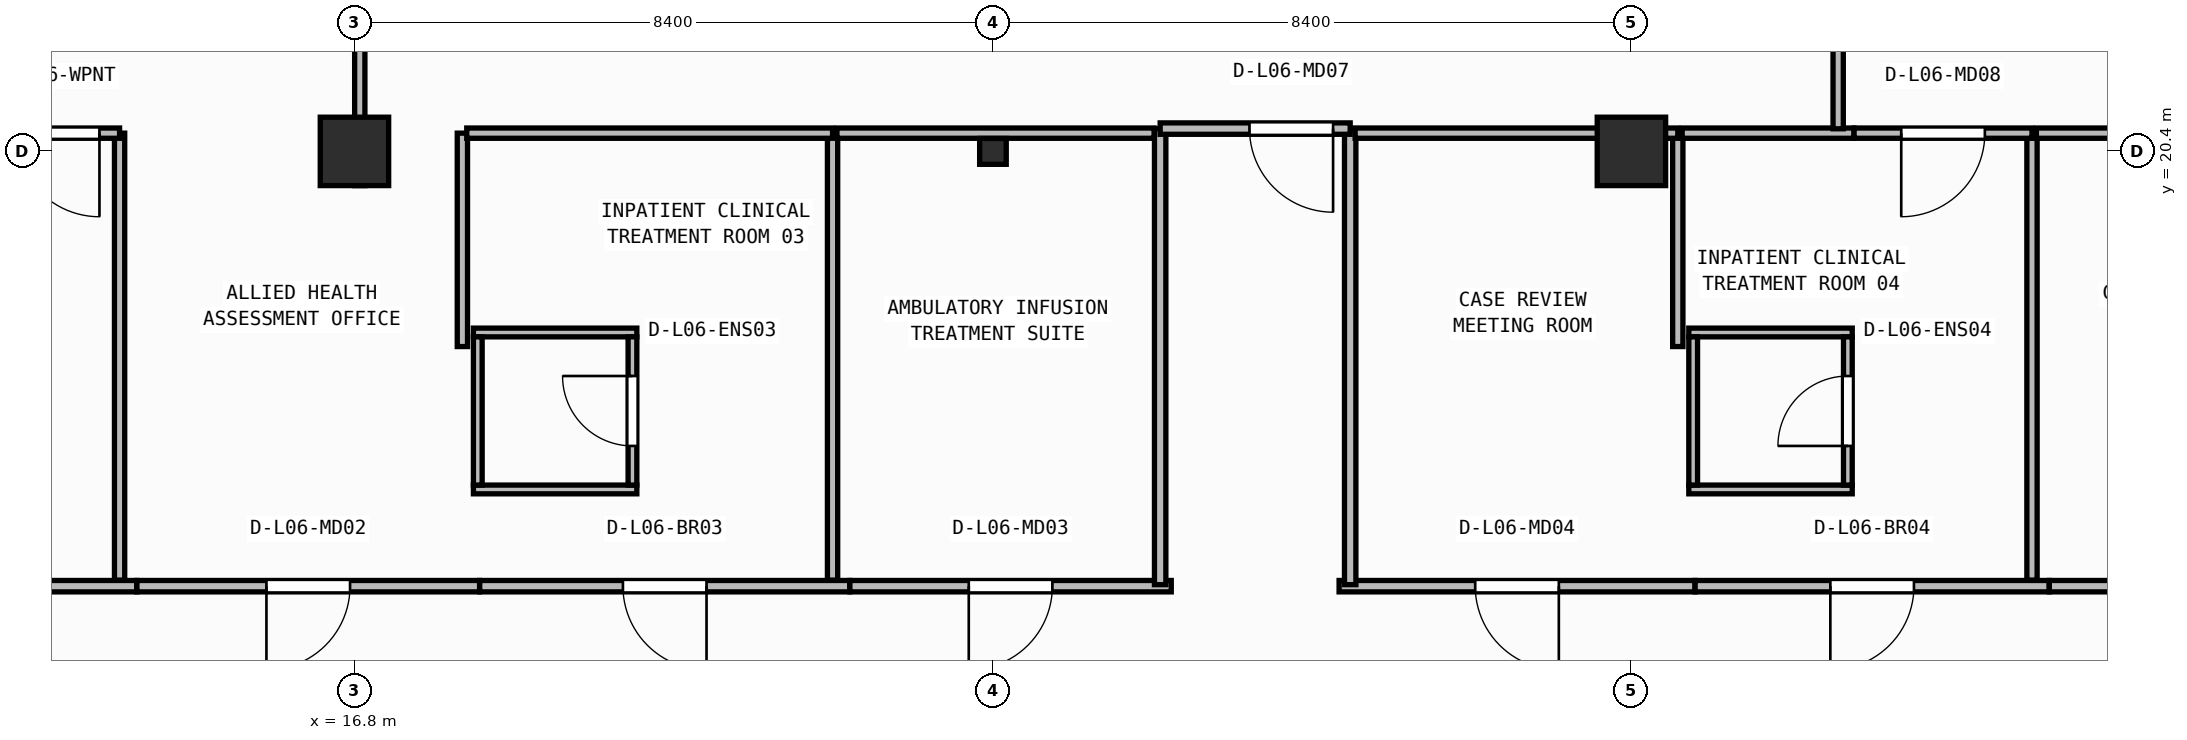
"""IFC4 building model, lengths in metres.
Left out: names, types, materials, properties, quantities, classifications, styles, units other than length and angle.
Written with IfcOpenShell. Run it as: python <this file> out.ifc"""

import sys

from ifc_helpers import new_model, si_unit, direction, frame, frame_2d, origin, origin_2d, place, context, subcontext, project, spatial, rectangle, i_section, extrude, element, fill, save


model = new_model("IFC4")
c1 = context("Model", 3, precision=1e-05, world=origin(), true_north=direction((0.0, 1.0)))
c2 = subcontext(c1, "Body", "Model", "MODEL_VIEW")
j1 = project(units=[si_unit("LENGTHUNIT", "METRE"), si_unit("PLANEANGLEUNIT", "RADIAN")], contexts=[c1])
p1 = place(None, origin())
s1 = spatial("IfcSite", under=j1, at=p1, CompositionType="ELEMENT")
p2 = place(p1, origin())
s2 = spatial("IfcBuilding", under=s1, at=p2, CompositionType="ELEMENT")
p3 = place(p2, frame((0.0, 0.0, 26.45)))
s3 = spatial("IfcBuildingStorey", under=s2, at=p3, CompositionType="ELEMENT", Elevation=26.45)
p4 = place(p3, frame((16.8, 20.4, 0.0), z_axis=(0.0, 0.0, 1.0), x_axis=(1.0, 0.0, 0.0)))
e1 = element("IfcColumn", 1, at=p4, inside=s3, PredefinedType="COLUMN", context=c2, shape_type="SweptSolid", body=[
    extrude(rectangle(XDim=0.9, YDim=0.9, at=origin_2d()), origin(), (0.0, 0.0, 1.0), 3.95),
])
p5 = place(p3, frame((25.2, 20.4, 0.0), z_axis=(0.0, 0.0, 1.0), x_axis=(1.0, 0.0, 0.0)))
e2 = element("IfcColumn", 2, at=p5, inside=s3, PredefinedType="COLUMN", context=c2, shape_type="SweptSolid", body=[
    extrude(i_section(OverallWidth=0.35, OverallDepth=0.34, WebThickness=0.016, FlangeThickness=0.028, at=origin_2d()), origin(), (0.0, 0.0, 1.0), 3.95),
])
p6 = place(p3, frame((33.6, 20.4, 0.0), z_axis=(0.0, 0.0, 1.0), x_axis=(1.0, 0.0, 0.0)))
e3 = element("IfcColumn", 3, at=p6, inside=s3, PredefinedType="COLUMN", context=c2, shape_type="SweptSolid", body=[
    extrude(rectangle(XDim=0.9, YDim=0.9, at=origin_2d()), origin(), (0.0, 0.0, 1.0), 3.95),
])
for number, where, z_axis, x_axis in (
    (4, (18.365, 15.952, 0.0), (0.0, 0.0, 1.0), (1.0, 0.0, 0.0)),
    (5, (18.365, 18.018, 0.0), (0.0, 0.0, 1.0), (1.0, 0.0, 0.0)),
):
    element("IfcWall", number, at=place(p3, frame(where, z_axis=z_axis, x_axis=x_axis)), inside=s3, PredefinedType="PARTITIONING", context=c2, shape_type="SweptSolid", body=[
        extrude(rectangle(XDim=2.15, YDim=0.115, at=frame_2d((1.075, 0.0))), origin(), (0.0, 0.0, 1.0), 3.71),
    ])
p7 = place(p3, frame((18.423, 16.01, 0.0), z_axis=(0.0, 0.0, 1.0), x_axis=(0.0, 1.0, 0.0)))
e6 = element("IfcWall", 6, at=p7, inside=s3, PredefinedType="PARTITIONING", context=c2, shape_type="SweptSolid", body=[
    extrude(rectangle(XDim=1.95, YDim=0.115, at=frame_2d((0.975, 0.0))), origin(), (0.0, 0.0, 1.0), 3.71),
])
p8 = place(p3, frame((20.458, 16.01, 0.0), z_axis=(0.0, 0.0, 1.0), x_axis=(0.0, 1.0, 0.0)))
e7 = element("IfcWall", 7, at=p8, inside=s3, PredefinedType="PARTITIONING", context=c2, shape_type="SweptSolid", body=[
    extrude(rectangle(XDim=1.95, YDim=0.115, at=frame_2d((0.975, 0.0))), origin(), (0.0, 0.0, 1.0), 3.71),
])
p9 = place(p8, frame((0.515, 0.0, 0.0)))
e8 = element("IfcOpeningElement", 8, at=p9, cuts=e7, PredefinedType="OPENING", context=c2, shape_type="SweptSolid", body=[
    extrude(rectangle(XDim=0.92, YDim=2.1, at=frame_2d((0.46, 1.05))), frame((0.0, 0.067, 0.0), z_axis=(0.0, -1.0, 0.0), x_axis=(1.0, 0.0, 0.0)), (0.0, 0.0, 1.0), 0.135),
])
p10 = place(p3, frame((34.355, 15.952, 0.0), z_axis=(0.0, 0.0, 1.0), x_axis=(1.0, 0.0, 0.0)))
e9 = element("IfcWall", 9, at=p10, inside=s3, PredefinedType="PARTITIONING", context=c2, shape_type="SweptSolid", body=[
    extrude(rectangle(XDim=2.15, YDim=0.115, at=frame_2d((1.075, 0.0))), origin(), (0.0, 0.0, 1.0), 3.378),
])
p11 = place(p3, frame((34.355, 18.018, 0.0), z_axis=(0.0, 0.0, 1.0), x_axis=(1.0, 0.0, 0.0)))
e10 = element("IfcWall", 10, at=p11, inside=s3, PredefinedType="PARTITIONING", context=c2, shape_type="SweptSolid", body=[
    extrude(rectangle(XDim=2.15, YDim=0.115, at=frame_2d((1.075, 0.0))), origin(), (0.0, 0.0, 1.0), 3.71),
])
p12 = place(p3, frame((34.413, 16.01, 0.0), z_axis=(0.0, 0.0, 1.0), x_axis=(0.0, 1.0, 0.0)))
e11 = element("IfcWall", 11, at=p12, inside=s3, PredefinedType="PARTITIONING", context=c2, shape_type="SweptSolid", body=[
    extrude(rectangle(XDim=1.95, YDim=0.115, at=frame_2d((0.975, 0.0))), origin(), (0.0, 0.0, 1.0), 3.71),
])
p13 = place(p3, frame((36.448, 16.01, 0.0), z_axis=(0.0, 0.0, 1.0), x_axis=(0.0, 1.0, 0.0)))
e12 = element("IfcWall", 12, at=p13, inside=s3, PredefinedType="PARTITIONING", context=c2, shape_type="SweptSolid", body=[
    extrude(rectangle(XDim=1.95, YDim=0.115, at=frame_2d((0.975, 0.0))), origin(), (0.0, 0.0, 1.0), 3.71),
])
p14 = place(p13, frame((0.515, 0.0, 0.0)))
e13 = element("IfcOpeningElement", 13, at=p14, cuts=e12, PredefinedType="OPENING", context=c2, shape_type="SweptSolid", body=[
    extrude(rectangle(XDim=0.92, YDim=2.1, at=frame_2d((0.46, 1.05))), frame((0.0, 0.067, 0.0), z_axis=(0.0, -1.0, 0.0), x_axis=(1.0, 0.0, 0.0)), (0.0, 0.0, 1.0), 0.135),
])
p15 = place(p3, frame((13.936, 14.68, 0.0), z_axis=(0.0, 0.0, 1.0), x_axis=(-1.0, 0.0, 0.0)))
e14 = element("IfcWall", 14, at=p15, inside=s3, PredefinedType="PARTITIONING", context=c2, shape_type="SweptSolid", body=[
    extrude(rectangle(XDim=4.148, YDim=0.15, at=frame_2d((2.074, 0.0))), origin(), (0.0, 0.0, 1.0), 3.71),
])
p16 = place(p15, frame((1.524, 0.0, 0.0)))
e15 = element("IfcOpeningElement", 15, at=p16, cuts=e14, PredefinedType="OPENING", context=c2, shape_type="SweptSolid", body=[
    extrude(rectangle(XDim=1.1, YDim=2.1, at=frame_2d((0.55, 1.05))), frame((0.0, 0.085, 0.0), z_axis=(0.0, -1.0, 0.0), x_axis=(1.0, 0.0, 0.0)), (0.0, 0.0, 1.0), 0.17),
])
p17 = place(p3, frame((18.446, 14.68, 0.0), z_axis=(0.0, 0.0, 1.0), x_axis=(-1.0, 0.0, 0.0)))
e16 = element("IfcWall", 16, at=p17, inside=s3, PredefinedType="PARTITIONING", context=c2, shape_type="SweptSolid", body=[
    extrude(rectangle(XDim=4.508, YDim=0.15, at=frame_2d((2.254, 0.0))), origin(), (0.0, 0.0, 1.0), 3.71),
])
p18 = place(p17, frame((1.704, 0.0, 0.0)))
e17 = element("IfcOpeningElement", 17, at=p18, cuts=e16, PredefinedType="OPENING", context=c2, shape_type="SweptSolid", body=[
    extrude(rectangle(XDim=1.1, YDim=2.1, at=frame_2d((0.55, 1.05))), frame((0.0, 0.085, 0.0), z_axis=(0.0, -1.0, 0.0), x_axis=(1.0, 0.0, 0.0)), (0.0, 0.0, 1.0), 0.17),
])
p19 = place(p3, frame((23.316, 14.68, 0.0), z_axis=(0.0, 0.0, 1.0), x_axis=(-1.0, 0.0, 0.0)))
e18 = element("IfcWall", 18, at=p19, inside=s3, PredefinedType="PARTITIONING", context=c2, shape_type="SweptSolid", body=[
    extrude(rectangle(XDim=4.868, YDim=0.15, at=frame_2d((2.434, 0.0))), origin(), (0.0, 0.0, 1.0), 3.71),
])
p20 = place(p19, frame((1.884, 0.0, 0.0)))
e19 = element("IfcOpeningElement", 19, at=p20, cuts=e18, PredefinedType="OPENING", context=c2, shape_type="SweptSolid", body=[
    extrude(rectangle(XDim=1.1, YDim=2.1, at=frame_2d((0.55, 1.05))), frame((0.0, 0.085, 0.0), z_axis=(0.0, -1.0, 0.0), x_axis=(1.0, 0.0, 0.0)), (0.0, 0.0, 1.0), 0.17),
])
p21 = place(p3, frame((27.546, 14.68, 0.0), z_axis=(0.0, 0.0, 1.0), x_axis=(-1.0, 0.0, 0.0)))
e20 = element("IfcWall", 20, at=p21, inside=s3, PredefinedType="PARTITIONING", context=c2, shape_type="SweptSolid", body=[
    extrude(rectangle(XDim=4.228, YDim=0.15, at=frame_2d((2.114, 0.0))), origin(), (0.0, 0.0, 1.0), 3.71),
])
p22 = place(p21, frame((1.564, 0.0, 0.0)))
e21 = element("IfcOpeningElement", 21, at=p22, cuts=e20, PredefinedType="OPENING", context=c2, shape_type="SweptSolid", body=[
    extrude(rectangle(XDim=1.1, YDim=2.1, at=frame_2d((0.55, 1.05))), frame((0.0, 0.085, 0.0), z_axis=(0.0, -1.0, 0.0), x_axis=(1.0, 0.0, 0.0)), (0.0, 0.0, 1.0), 0.17),
])
p23 = place(p3, frame((34.436, 14.68, 0.0), z_axis=(0.0, 0.0, 1.0), x_axis=(-1.0, 0.0, 0.0)))
e22 = element("IfcWall", 22, at=p23, inside=s3, PredefinedType="PARTITIONING", context=c2, shape_type="SweptSolid", body=[
    extrude(rectangle(XDim=4.682, YDim=0.15, at=frame_2d((2.341, 0.0))), origin(), (0.0, 0.0, 1.0), 3.71),
])
p24 = place(p23, frame((1.791, 0.0, 0.0)))
e23 = element("IfcOpeningElement", 23, at=p24, cuts=e22, PredefinedType="OPENING", context=c2, shape_type="SweptSolid", body=[
    extrude(rectangle(XDim=1.1, YDim=2.1, at=frame_2d((0.55, 1.05))), frame((0.0, 0.085, 0.0), z_axis=(0.0, -1.0, 0.0), x_axis=(1.0, 0.0, 0.0)), (0.0, 0.0, 1.0), 0.17),
])
p25 = place(p3, frame((39.096, 14.68, 0.0), z_axis=(0.0, 0.0, 1.0), x_axis=(-1.0, 0.0, 0.0)))
e24 = element("IfcWall", 24, at=p25, inside=s3, PredefinedType="PARTITIONING", context=c2, shape_type="SweptSolid", body=[
    extrude(rectangle(XDim=4.658, YDim=0.15, at=frame_2d((2.329, 0.0))), origin(), (0.0, 0.0, 1.0), 3.71),
])
p26 = place(p25, frame((1.779, 0.0, 0.0)))
e25 = element("IfcOpeningElement", 25, at=p26, cuts=e24, PredefinedType="OPENING", context=c2, shape_type="SweptSolid", body=[
    extrude(rectangle(XDim=1.1, YDim=2.1, at=frame_2d((0.55, 1.05))), frame((0.0, 0.085, 0.0), z_axis=(0.0, -1.0, 0.0), x_axis=(1.0, 0.0, 0.0)), (0.0, 0.0, 1.0), 0.17),
])
p27 = place(p3, frame((44.136, 14.68, 0.0), z_axis=(0.0, 0.0, 1.0), x_axis=(-1.0, 0.0, 0.0)))
e26 = element("IfcWall", 26, at=p27, inside=s3, PredefinedType="PARTITIONING", context=c2, shape_type="SweptSolid", body=[
    extrude(rectangle(XDim=5.038, YDim=0.15, at=frame_2d((2.519, 0.0))), origin(), (0.0, 0.0, 1.0), 3.71),
])
p28 = place(p27, frame((1.969, 0.0, 0.0)))
e27 = element("IfcOpeningElement", 27, at=p28, cuts=e26, PredefinedType="OPENING", context=c2, shape_type="SweptSolid", body=[
    extrude(rectangle(XDim=1.1, YDim=2.1, at=frame_2d((0.55, 1.05))), frame((0.0, 0.085, 0.0), z_axis=(0.0, -1.0, 0.0), x_axis=(1.0, 0.0, 0.0)), (0.0, 0.0, 1.0), 0.17),
])
for number, where, z_axis, x_axis in (
    (28, (27.4, 20.7, 0.0), (0.0, 0.0, 1.0), (0.0, -1.0, 0.0)),
    (29, (29.9, 14.7, 0.0), (0.0, 0.0, 1.0), (0.0, 1.0, 0.0)),
):
    element("IfcWall", number, at=place(p3, frame(where, z_axis=z_axis, x_axis=x_axis)), inside=s3, PredefinedType="PARTITIONING", context=c2, shape_type="SweptSolid", body=[
        extrude(rectangle(XDim=6.0, YDim=0.15, at=frame_2d((3.0, 0.0))), origin(), (0.0, 0.0, 1.0), 3.71),
    ])
p29 = place(p3, frame((29.9, 20.7, 0.0), z_axis=(0.0, 0.0, 1.0), x_axis=(-1.0, 0.0, 0.0)))
e30 = element("IfcWall", 30, at=p29, inside=s3, PredefinedType="PARTITIONING", context=c2, shape_type="SweptSolid", body=[
    extrude(rectangle(XDim=2.5, YDim=0.15, at=frame_2d((1.25, 0.0))), origin(), (0.0, 0.0, 1.0), 3.073),
])
p30 = place(p29, frame((0.225, 0.0, 0.0)))
e31 = element("IfcOpeningElement", 31, at=p30, cuts=e30, PredefinedType="OPENING", context=c2, shape_type="SweptSolid", body=[
    extrude(rectangle(XDim=1.1, YDim=2.1, at=frame_2d((0.55, 1.05))), frame((0.0, 0.085, 0.0), z_axis=(0.0, -1.0, 0.0), x_axis=(1.0, 0.0, 0.0)), (0.0, 0.0, 1.0), 0.17),
])
p31 = place(p3, frame((13.71, 14.76, 0.0), z_axis=(0.0, 0.0, 1.0), x_axis=(0.0, 1.0, 0.0)))
e32 = element("IfcWall", 32, at=p31, inside=s3, PredefinedType="PARTITIONING", context=c2, shape_type="SweptSolid", body=[
    extrude(rectangle(XDim=5.88, YDim=0.135, at=frame_2d((2.94, 0.0))), origin(), (0.0, 0.0, 1.0), 3.71),
])
p32 = place(p3, frame((13.71, 20.64, 0.0), z_axis=(0.0, 0.0, 1.0), x_axis=(-1.0, 0.0, 0.0)))
e33 = element("IfcWall", 33, at=p32, inside=s3, PredefinedType="PARTITIONING", context=c2, shape_type="SweptSolid", body=[
    extrude(rectangle(XDim=4.093, YDim=0.135, at=frame_2d((2.046, 0.0))), origin(), (0.0, 0.0, 1.0), 3.073),
])
p33 = place(p32, frame((0.265, 0.0, 0.0)))
e34 = element("IfcOpeningElement", 34, at=p33, cuts=e33, PredefinedType="OPENING", context=c2, shape_type="SweptSolid", body=[
    extrude(rectangle(XDim=1.1, YDim=2.1, at=frame_2d((0.55, 1.05))), frame((0.0, 0.077, 0.0), z_axis=(0.0, -1.0, 0.0), x_axis=(1.0, 0.0, 0.0)), (0.0, 0.0, 1.0), 0.155),
])
p34 = place(p3, frame((18.22, 17.833, 0.0), z_axis=(0.0, 0.0, 1.0), x_axis=(0.0, 1.0, 0.0)))
e35 = element("IfcWall", 35, at=p34, inside=s3, PredefinedType="PARTITIONING", context=c2, shape_type="SweptSolid", body=[
    extrude(rectangle(XDim=2.807, YDim=0.135, at=frame_2d((1.404, 0.0))), origin(), (0.0, 0.0, 1.0), 3.71),
])
p35 = place(p3, frame((23.09, 14.76, 0.0), z_axis=(0.0, 0.0, 1.0), x_axis=(0.0, 1.0, 0.0)))
e36 = element("IfcWall", 36, at=p35, inside=s3, PredefinedType="PARTITIONING", context=c2, shape_type="SweptSolid", body=[
    extrude(rectangle(XDim=5.88, YDim=0.135, at=frame_2d((2.94, 0.0))), origin(), (0.0, 0.0, 1.0), 3.71),
])
p36 = place(p3, frame((23.09, 20.64, 0.0), z_axis=(0.0, 0.0, 1.0), x_axis=(-1.0, 0.0, 0.0)))
e37 = element("IfcWall", 37, at=p36, inside=s3, PredefinedType="PARTITIONING", context=c2, shape_type="SweptSolid", body=[
    extrude(rectangle(XDim=4.812, YDim=0.135, at=frame_2d((2.406, 0.0))), origin(), (0.0, 0.0, 1.0), 3.073),
])
p37 = place(p3, frame((27.32, 20.64, 0.0), z_axis=(0.0, 0.0, 1.0), x_axis=(-1.0, 0.0, 0.0)))
e38 = element("IfcWall", 38, at=p37, inside=s3, PredefinedType="PARTITIONING", context=c2, shape_type="SweptSolid", body=[
    extrude(rectangle(XDim=4.173, YDim=0.135, at=frame_2d((2.086, 0.0))), origin(), (0.0, 0.0, 1.0), 3.073),
])
p38 = place(p3, frame((34.21, 17.833, 0.0), z_axis=(0.0, 0.0, 1.0), x_axis=(0.0, 1.0, 0.0)))
e39 = element("IfcWall", 39, at=p38, inside=s3, PredefinedType="PARTITIONING", context=c2, shape_type="SweptSolid", body=[
    extrude(rectangle(XDim=2.807, YDim=0.135, at=frame_2d((1.404, 0.0))), origin(), (0.0, 0.0, 1.0), 3.71),
])
p39 = place(p3, frame((34.21, 20.64, 0.0), z_axis=(0.0, 0.0, 1.0), x_axis=(-1.0, 0.0, 0.0)))
e40 = element("IfcWall", 40, at=p39, inside=s3, PredefinedType="PARTITIONING", context=c2, shape_type="SweptSolid", body=[
    extrude(rectangle(XDim=4.245, YDim=0.135, at=frame_2d((2.123, 0.0))), origin(), (0.0, 0.0, 1.0), 3.073),
])
p40 = place(p3, frame((38.87, 14.76, 0.0), z_axis=(0.0, 0.0, 1.0), x_axis=(0.0, 1.0, 0.0)))
e41 = element("IfcWall", 41, at=p40, inside=s3, PredefinedType="PARTITIONING", context=c2, shape_type="SweptSolid", body=[
    extrude(rectangle(XDim=5.88, YDim=0.135, at=frame_2d((2.94, 0.0))), origin(), (0.0, 0.0, 1.0), 3.71),
])
p41 = place(p3, frame((36.528, 20.64, 0.0), z_axis=(0.0, 0.0, 1.0), x_axis=(-1.0, 0.0, 0.0)))
e42 = element("IfcWall", 42, at=p41, inside=s3, PredefinedType="PARTITIONING", context=c2, shape_type="SweptSolid", body=[
    extrude(rectangle(XDim=2.26, YDim=0.135, at=frame_2d((1.13, 0.0))), origin(), (0.0, 0.0, 1.0), 3.073),
])
p42 = place(p3, frame((38.87, 20.64, 0.0), z_axis=(0.0, 0.0, 1.0), x_axis=(-1.0, 0.0, 0.0)))
e43 = element("IfcWall", 43, at=p42, inside=s3, PredefinedType="PARTITIONING", context=c2, shape_type="SweptSolid", body=[
    extrude(rectangle(XDim=2.341, YDim=0.135, at=frame_2d((1.17, 0.0))), origin(), (0.0, 0.0, 1.0), 3.073),
])
p43 = place(p42, frame((0.62, 0.0, 0.0)))
e44 = element("IfcOpeningElement", 44, at=p43, cuts=e43, PredefinedType="OPENING", context=c2, shape_type="SweptSolid", body=[
    extrude(rectangle(XDim=1.1, YDim=2.1, at=frame_2d((0.55, 1.05))), frame((0.0, 0.077, 0.0), z_axis=(0.0, -1.0, 0.0), x_axis=(1.0, 0.0, 0.0)), (0.0, 0.0, 1.0), 0.155),
])
p44 = place(p3, frame((43.91, 20.64, 0.0), z_axis=(0.0, 0.0, 1.0), x_axis=(-1.0, 0.0, 0.0)))
e45 = element("IfcWall", 45, at=p44, inside=s3, PredefinedType="PARTITIONING", context=c2, shape_type="SweptSolid", body=[
    extrude(rectangle(XDim=4.982, YDim=0.135, at=frame_2d((2.491, 0.0))), origin(), (0.0, 0.0, 1.0), 3.073),
])
p45 = place(p3, frame((16.87, 19.95, 0.0), z_axis=(0.0, 0.0, 1.0), x_axis=(0.0, 1.0, 0.0)))
e46 = element("IfcWall", 46, at=p45, inside=s3, PredefinedType="PARTITIONING", context=c2, shape_type="SweptSolid", body=[
    extrude(rectangle(XDim=7.19, YDim=0.135, at=frame_2d((3.595, 0.0))), origin(), (0.0, 0.0, 1.0), 3.073),
])
p46 = place(p3, frame((36.32, 20.698, 0.0), z_axis=(0.0, 0.0, 1.0), x_axis=(0.0, 1.0, 0.0)))
e47 = element("IfcWall", 47, at=p46, inside=s3, PredefinedType="PARTITIONING", context=c2, shape_type="SweptSolid", body=[
    extrude(rectangle(XDim=6.442, YDim=0.135, at=frame_2d((3.221, 0.0))), origin(), (0.0, 0.0, 1.0), 3.71),
])
p47 = place(p9, origin())
e48 = element("IfcDoor", 48, at=p47, inside=s3, OperationType="SINGLE_SWING_RIGHT", PredefinedType="DOOR", context=c2, shape_type="SweptSolid", body=[
    extrude(rectangle(XDim=0.92, YDim=2.1, at=frame_2d((0.46, 1.05))), frame((0.0, 0.025, 0.0), z_axis=(0.0, -1.0, 0.0), x_axis=(1.0, 0.0, 0.0)), (0.0, 0.0, 1.0), 0.05),
])
fill(e8, e48)
p48 = place(p14, origin())
e49 = element("IfcDoor", 49, at=p48, inside=s3, OperationType="SINGLE_SWING_LEFT", PredefinedType="DOOR", context=c2, shape_type="SweptSolid", body=[
    extrude(rectangle(XDim=0.92, YDim=2.1, at=frame_2d((0.46, 1.05))), frame((0.0, 0.025, 0.0), z_axis=(0.0, -1.0, 0.0), x_axis=(1.0, 0.0, 0.0)), (0.0, 0.0, 1.0), 0.05),
])
fill(e13, e49)
p49 = place(p18, origin())
e50 = element("IfcDoor", 50, at=p49, inside=s3, OperationType="SINGLE_SWING_RIGHT", PredefinedType="DOOR", context=c2, shape_type="SweptSolid", body=[
    extrude(rectangle(XDim=1.1, YDim=2.1, at=frame_2d((0.55, 1.05))), frame((0.0, 0.025, 0.0), z_axis=(0.0, -1.0, 0.0), x_axis=(1.0, 0.0, 0.0)), (0.0, 0.0, 1.0), 0.05),
])
fill(e17, e50)
p50 = place(p20, origin())
e51 = element("IfcDoor", 51, at=p50, inside=s3, OperationType="SINGLE_SWING_LEFT", PredefinedType="DOOR", context=c2, shape_type="SweptSolid", body=[
    extrude(rectangle(XDim=1.1, YDim=2.1, at=frame_2d((0.55, 1.05))), frame((0.0, 0.025, 0.0), z_axis=(0.0, -1.0, 0.0), x_axis=(1.0, 0.0, 0.0)), (0.0, 0.0, 1.0), 0.05),
])
fill(e19, e51)
p51 = place(p22, origin())
e52 = element("IfcDoor", 52, at=p51, inside=s3, OperationType="SINGLE_SWING_RIGHT", PredefinedType="DOOR", context=c2, shape_type="SweptSolid", body=[
    extrude(rectangle(XDim=1.1, YDim=2.1, at=frame_2d((0.55, 1.05))), frame((0.0, 0.025, 0.0), z_axis=(0.0, -1.0, 0.0), x_axis=(1.0, 0.0, 0.0)), (0.0, 0.0, 1.0), 0.05),
])
fill(e21, e52)
p52 = place(p24, origin())
e53 = element("IfcDoor", 53, at=p52, inside=s3, OperationType="SINGLE_SWING_LEFT", PredefinedType="DOOR", context=c2, shape_type="SweptSolid", body=[
    extrude(rectangle(XDim=1.1, YDim=2.1, at=frame_2d((0.55, 1.05))), frame((0.0, 0.025, 0.0), z_axis=(0.0, -1.0, 0.0), x_axis=(1.0, 0.0, 0.0)), (0.0, 0.0, 1.0), 0.05),
])
fill(e23, e53)
p53 = place(p26, origin())
e54 = element("IfcDoor", 54, at=p53, inside=s3, OperationType="SINGLE_SWING_RIGHT", PredefinedType="DOOR", context=c2, shape_type="SweptSolid", body=[
    extrude(rectangle(XDim=1.1, YDim=2.1, at=frame_2d((0.55, 1.05))), frame((0.0, 0.025, 0.0), z_axis=(0.0, -1.0, 0.0), x_axis=(1.0, 0.0, 0.0)), (0.0, 0.0, 1.0), 0.05),
])
fill(e25, e54)
p54 = place(p30, origin())
e55 = element("IfcDoor", 55, at=p54, inside=s3, OperationType="SINGLE_SWING_LEFT", PredefinedType="DOOR", context=c2, shape_type="SweptSolid", body=[
    extrude(rectangle(XDim=1.1, YDim=2.1, at=frame_2d((0.55, 1.05))), frame((0.0, 0.025, 0.0), z_axis=(0.0, -1.0, 0.0), x_axis=(1.0, 0.0, 0.0)), (0.0, 0.0, 1.0), 0.05),
])
fill(e31, e55)
p55 = place(p33, origin())
e56 = element("IfcDoor", 56, at=p55, inside=s3, OperationType="SINGLE_SWING_LEFT", PredefinedType="DOOR", context=c2, shape_type="SweptSolid", body=[
    extrude(rectangle(XDim=1.1, YDim=2.1, at=frame_2d((0.55, 1.05))), frame((0.0, 0.025, 0.0), z_axis=(0.0, -1.0, 0.0), x_axis=(1.0, 0.0, 0.0)), (0.0, 0.0, 1.0), 0.05),
])
fill(e34, e56)
p56 = place(p43, origin())
e57 = element("IfcDoor", 57, at=p56, inside=s3, OperationType="SINGLE_SWING_RIGHT", PredefinedType="DOOR", context=c2, shape_type="SweptSolid", body=[
    extrude(rectangle(XDim=1.1, YDim=2.1, at=frame_2d((0.55, 1.05))), frame((0.0, 0.025, 0.0), z_axis=(0.0, -1.0, 0.0), x_axis=(1.0, 0.0, 0.0)), (0.0, 0.0, 1.0), 0.05),
])
fill(e44, e57)
save(model, sys.argv[1])
